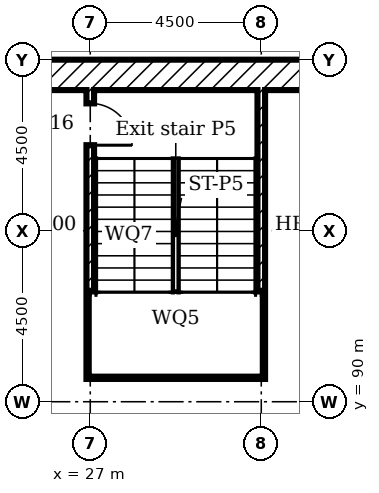
"""IFC4 building model, lengths in metres.
Left out: names, types, materials, properties, quantities, classifications, styles, units other than length and angle.
Written with IfcOpenShell. Run it as: python <this file> out.ifc"""

import sys

from ifc_helpers import new_model, si_unit, direction, frame, frame_2d, origin, place, context, subcontext, project, spatial, rectangle, extrude, element, fill, save


model = new_model("IFC4")
c1 = context("Model", 3, precision=1e-05, world=origin(), true_north=direction((0.0, 1.0)))
c2 = subcontext(c1, "Body", "Model", "MODEL_VIEW")
j1 = project(units=[si_unit("LENGTHUNIT", "METRE"), si_unit("PLANEANGLEUNIT", "RADIAN")], contexts=[c1])
p1 = place(None, origin())
s1 = spatial("IfcSite", under=j1, at=p1, CompositionType="ELEMENT")
p2 = place(p1, origin())
s2 = spatial("IfcBuilding", under=s1, at=p2, CompositionType="ELEMENT")
p3 = place(p2, frame((0.0, 0.0, -8.0)))
s3 = spatial("IfcBuildingStorey", under=s2, at=p3, CompositionType="ELEMENT", Elevation=-8.0)
p4 = place(p3, frame((0.0, 98.6, 0.0)))
e1 = element("IfcWall", 1, at=p4, inside=s3, PredefinedType="SOLIDWALL", context=c2, shape_type="SweptSolid", body=[
    extrude(rectangle(XDim=153.0, YDim=0.8, at=frame_2d((76.5, 0.0))), origin(), (0.0, 0.0, 1.0), 4.0),
])
p5 = place(p3, frame((27.0, 90.6, 0.0), z_axis=(0.0, 0.0, 1.0), x_axis=(0.0, 1.0, 0.0)))
e2 = element("IfcWall", 2, at=p5, inside=s3, PredefinedType="SOLIDWALL", context=c2, shape_type="SweptSolid", body=[
    extrude(rectangle(XDim=7.6, YDim=0.2, at=frame_2d((3.8, 0.0))), origin(), (0.0, 0.0, 1.0), 3.55),
])
p6 = place(p5, frame((6.15, 0.0, 0.0)))
e3 = element("IfcOpeningElement", 3, at=p6, cuts=e2, PredefinedType="OPENING", context=c2, shape_type="SweptSolid", body=[
    extrude(rectangle(XDim=1.1, YDim=2.1, at=frame_2d((0.55, 1.05))), frame((0.0, 0.11, 0.0), z_axis=(0.0, -1.0, 0.0), x_axis=(1.0, 0.0, 0.0)), (0.0, 0.0, 1.0), 0.22),
])
p7 = place(p3, frame((31.5, 90.6, 0.0), z_axis=(0.0, 0.0, 1.0), x_axis=(0.0, 1.0, 0.0)))
e4 = element("IfcWall", 4, at=p7, inside=s3, PredefinedType="SOLIDWALL", context=c2, shape_type="SweptSolid", body=[
    extrude(rectangle(XDim=7.6, YDim=0.2, at=frame_2d((3.8, 0.0))), origin(), (0.0, 0.0, 1.0), 3.55),
])
p8 = place(p3, frame((27.1, 90.7, 0.0)))
e5 = element("IfcWall", 5, at=p8, inside=s3, PredefinedType="SOLIDWALL", context=c2, shape_type="SweptSolid", body=[
    extrude(rectangle(XDim=4.3, YDim=0.2, at=frame_2d((2.15, 0.0))), origin(), (0.0, 0.0, 1.0), 3.55),
])
for number, where, z_axis, x_axis in (
    (6, (31.4, 92.78, 0.0), (0.0, 0.0, 1.0), (-1.0, 0.0, 0.0)),
    (7, (31.4, 91.4, 0.0), (0.0, 0.0, 1.0), (-1.0, 0.0, 0.0)),
):
    element("IfcWall", number, at=place(p3, frame(where, z_axis=z_axis, x_axis=x_axis)), inside=s3, PredefinedType="SOLIDWALL", context=c2, shape_type="SweptSolid", body=[
        extrude(rectangle(XDim=4.3, YDim=0.2, at=frame_2d((2.15, 0.0))), origin(), (0.0, 0.0, 1.0), 1.8),
    ])
p9 = place(p6, frame((1.1, 0.0, 0.0), x_axis=(-1.0, 0.0, 0.0)))
e8 = element("IfcDoor", 8, at=p9, inside=s3, OperationType="SINGLE_SWING_LEFT", PredefinedType="DOOR", context=c2, shape_type="SweptSolid", body=[
    extrude(rectangle(XDim=1.1, YDim=2.1, at=frame_2d((0.55, 1.05))), frame((0.0, 0.025, 0.0), z_axis=(0.0, -1.0, 0.0), x_axis=(1.0, 0.0, 0.0)), (0.0, 0.0, 1.0), 0.05),
])
fill(e3, e8)
save(model, sys.argv[1])
